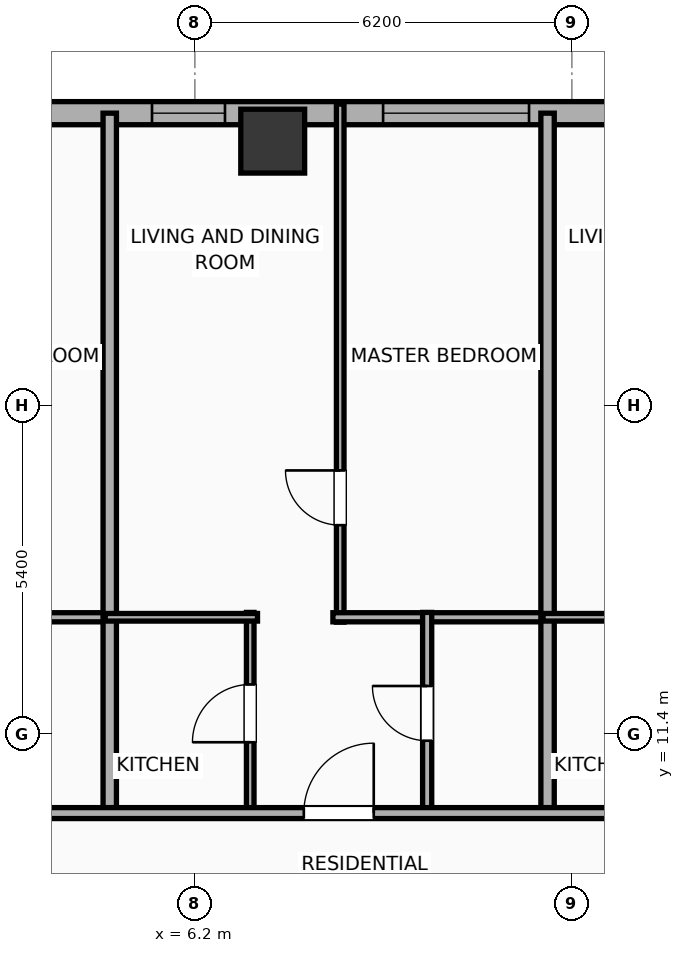
"""IFC4 building model, lengths in metres.
Left out: names, types, materials, properties, quantities, classifications, styles, units other than length and angle.
Written with IfcOpenShell. Run it as: python <this file> out.ifc"""

import sys

from ifc_helpers import new_model, si_unit, direction, frame, frame_2d, origin, origin_2d, place, context, subcontext, project, spatial, rectangle, hollow_rectangle, extrude, element, fill, save


model = new_model("IFC4")
c1 = context("Model", 3, precision=1e-05, world=origin(), true_north=direction((0.0, 1.0)))
c2 = subcontext(c1, "Body", "Model", "MODEL_VIEW")
j1 = project(units=[si_unit("LENGTHUNIT", "METRE"), si_unit("PLANEANGLEUNIT", "RADIAN")], contexts=[c1])
p1 = place(None, origin())
s1 = spatial("IfcSite", under=j1, at=p1, CompositionType="ELEMENT")
p2 = place(p1, origin())
s2 = spatial("IfcBuilding", under=s1, at=p2, CompositionType="ELEMENT")
p3 = place(p2, frame((0.0, 0.0, 136.5)))
s3 = spatial("IfcBuildingStorey", under=s2, at=p3, CompositionType="ELEMENT", Elevation=136.5)
p4 = place(p3, frame((7.48, 21.15, 0.0), z_axis=(0.0, 0.0, 1.0), x_axis=(1.0, 0.0, 0.0)))
e1 = element("IfcColumn", 1, at=p4, inside=s3, PredefinedType="COLUMN", context=c2, shape_type="SweptSolid", body=[
    extrude(hollow_rectangle(XDim=1.05, YDim=1.05, WallThickness=0.036, at=origin_2d()), origin(), (0.0, 0.0, 1.0), 3.865),
])
p5 = place(p3, frame((-25.381, 21.61, 0.0), z_axis=(0.0, 0.0, 1.0), x_axis=(1.0, 0.0, 0.0)))
e2 = element("IfcWall", 2, at=p5, inside=s3, PredefinedType="ELEMENTEDWALL", context=c2, shape_type="SweptSolid", body=[
    extrude(rectangle(XDim=54.763, YDim=0.38, at=frame_2d((27.381, 0.0))), origin(), (0.0, 0.0, 1.0), 2.39),
])
p6 = place(p5, frame((5.645, 0.0, 0.75)))
e3 = element("IfcOpeningElement", 3, at=p6, cuts=e2, PredefinedType="OPENING", context=c2, shape_type="SweptSolid", body=[
    extrude(rectangle(XDim=2.4, YDim=1.45, at=frame_2d((1.2, 0.725))), frame((0.0, 0.2, 0.0), z_axis=(0.0, -1.0, 0.0), x_axis=(1.0, 0.0, 0.0)), (0.0, 0.0, 1.0), 0.4),
])
p7 = place(p5, frame((34.677, 0.0, 0.75)))
e4 = element("IfcOpeningElement", 4, at=p7, cuts=e2, PredefinedType="OPENING", context=c2, shape_type="SweptSolid", body=[
    extrude(rectangle(XDim=2.4, YDim=1.45, at=frame_2d((1.2, 0.725))), frame((0.0, 0.2, 0.0), z_axis=(0.0, -1.0, 0.0), x_axis=(1.0, 0.0, 0.0)), (0.0, 0.0, 1.0), 0.4),
])
p8 = place(p5, frame((45.067, 0.0, 0.75)))
e5 = element("IfcOpeningElement", 5, at=p8, cuts=e2, PredefinedType="OPENING", context=c2, shape_type="SweptSolid", body=[
    extrude(rectangle(XDim=2.4, YDim=1.45, at=frame_2d((1.2, 0.725))), frame((0.0, 0.2, 0.0), z_axis=(0.0, -1.0, 0.0), x_axis=(1.0, 0.0, 0.0)), (0.0, 0.0, 1.0), 0.4),
])
p9 = place(p5, frame((2.938, 0.0, 0.55)))
e6 = element("IfcOpeningElement", 6, at=p9, cuts=e2, PredefinedType="OPENING", context=c2, shape_type="SweptSolid", body=[
    extrude(rectangle(XDim=1.2, YDim=1.15, at=frame_2d((0.6, 0.575))), frame((0.0, 0.2, 0.0), z_axis=(0.0, -1.0, 0.0), x_axis=(1.0, 0.0, 0.0)), (0.0, 0.0, 1.0), 0.4),
])
p10 = place(p5, frame((8.916, 0.0, 0.55)))
e7 = element("IfcOpeningElement", 7, at=p10, cuts=e2, PredefinedType="OPENING", context=c2, shape_type="SweptSolid", body=[
    extrude(rectangle(XDim=1.2, YDim=1.15, at=frame_2d((0.6, 0.575))), frame((0.0, 0.2, 0.0), z_axis=(0.0, -1.0, 0.0), x_axis=(1.0, 0.0, 0.0)), (0.0, 0.0, 1.0), 0.4),
])
p11 = place(p5, frame((13.476, 0.0, 0.55)))
e8 = element("IfcOpeningElement", 8, at=p11, cuts=e2, PredefinedType="OPENING", context=c2, shape_type="SweptSolid", body=[
    extrude(rectangle(XDim=1.2, YDim=1.15, at=frame_2d((0.6, 0.575))), frame((0.0, 0.2, 0.0), z_axis=(0.0, -1.0, 0.0), x_axis=(1.0, 0.0, 0.0)), (0.0, 0.0, 1.0), 0.4),
])
p12 = place(p5, frame((17.076, 0.0, 0.55)))
e9 = element("IfcOpeningElement", 9, at=p12, cuts=e2, PredefinedType="OPENING", context=c2, shape_type="SweptSolid", body=[
    extrude(rectangle(XDim=1.2, YDim=1.15, at=frame_2d((0.6, 0.575))), frame((0.0, 0.2, 0.0), z_axis=(0.0, -1.0, 0.0), x_axis=(1.0, 0.0, 0.0)), (0.0, 0.0, 1.0), 0.4),
])
p13 = place(p5, frame((19.956, 0.0, 0.55)))
e10 = element("IfcOpeningElement", 10, at=p13, cuts=e2, PredefinedType="OPENING", context=c2, shape_type="SweptSolid", body=[
    extrude(rectangle(XDim=1.2, YDim=1.15, at=frame_2d((0.6, 0.575))), frame((0.0, 0.2, 0.0), z_axis=(0.0, -1.0, 0.0), x_axis=(1.0, 0.0, 0.0)), (0.0, 0.0, 1.0), 0.4),
])
p14 = place(p5, frame((24.276, 0.0, 0.55)))
e11 = element("IfcOpeningElement", 11, at=p14, cuts=e2, PredefinedType="OPENING", context=c2, shape_type="SweptSolid", body=[
    extrude(rectangle(XDim=1.2, YDim=1.15, at=frame_2d((0.6, 0.575))), frame((0.0, 0.2, 0.0), z_axis=(0.0, -1.0, 0.0), x_axis=(1.0, 0.0, 0.0)), (0.0, 0.0, 1.0), 0.4),
])
p15 = place(p5, frame((27.876, 0.0, 0.55)))
e12 = element("IfcOpeningElement", 12, at=p15, cuts=e2, PredefinedType="OPENING", context=c2, shape_type="SweptSolid", body=[
    extrude(rectangle(XDim=1.2, YDim=1.15, at=frame_2d((0.6, 0.575))), frame((0.0, 0.2, 0.0), z_axis=(0.0, -1.0, 0.0), x_axis=(1.0, 0.0, 0.0)), (0.0, 0.0, 1.0), 0.4),
])
p16 = place(p5, frame((30.876, 0.0, 0.55)))
e13 = element("IfcOpeningElement", 13, at=p16, cuts=e2, PredefinedType="OPENING", context=c2, shape_type="SweptSolid", body=[
    extrude(rectangle(XDim=1.2, YDim=1.15, at=frame_2d((0.6, 0.575))), frame((0.0, 0.2, 0.0), z_axis=(0.0, -1.0, 0.0), x_axis=(1.0, 0.0, 0.0)), (0.0, 0.0, 1.0), 0.4),
])
p17 = place(p5, frame((38.676, 0.0, 0.55)))
e14 = element("IfcOpeningElement", 14, at=p17, cuts=e2, PredefinedType="OPENING", context=c2, shape_type="SweptSolid", body=[
    extrude(rectangle(XDim=1.2, YDim=1.15, at=frame_2d((0.6, 0.575))), frame((0.0, 0.2, 0.0), z_axis=(0.0, -1.0, 0.0), x_axis=(1.0, 0.0, 0.0)), (0.0, 0.0, 1.0), 0.4),
])
p18 = place(p5, frame((41.796, 0.0, 0.55)))
e15 = element("IfcOpeningElement", 15, at=p18, cuts=e2, PredefinedType="OPENING", context=c2, shape_type="SweptSolid", body=[
    extrude(rectangle(XDim=1.2, YDim=1.15, at=frame_2d((0.6, 0.575))), frame((0.0, 0.2, 0.0), z_axis=(0.0, -1.0, 0.0), x_axis=(1.0, 0.0, 0.0)), (0.0, 0.0, 1.0), 0.4),
])
p19 = place(p5, frame((49.476, 0.0, 0.55)))
e16 = element("IfcOpeningElement", 16, at=p19, cuts=e2, PredefinedType="OPENING", context=c2, shape_type="SweptSolid", body=[
    extrude(rectangle(XDim=1.2, YDim=1.15, at=frame_2d((0.6, 0.575))), frame((0.0, 0.2, 0.0), z_axis=(0.0, -1.0, 0.0), x_axis=(1.0, 0.0, 0.0)), (0.0, 0.0, 1.0), 0.4),
])
p20 = place(p5, frame((52.227, 0.0, 0.55)))
e17 = element("IfcOpeningElement", 17, at=p20, cuts=e2, PredefinedType="OPENING", context=c2, shape_type="SweptSolid", body=[
    extrude(rectangle(XDim=1.2, YDim=1.15, at=frame_2d((0.6, 0.575))), frame((0.0, 0.2, 0.0), z_axis=(0.0, -1.0, 0.0), x_axis=(1.0, 0.0, 0.0)), (0.0, 0.0, 1.0), 0.4),
])
p21 = place(p3, frame((1.27, 13.32, 0.0), z_axis=(0.0, 0.0, 1.0), x_axis=(1.0, 0.0, 0.0)))
e18 = element("IfcWall", 18, at=p21, inside=s3, PredefinedType="PLUMBINGWALL", context=c2, shape_type="SweptSolid", body=[
    extrude(rectangle(XDim=3.605, YDim=0.15, at=frame_2d((1.802, 0.0))), origin(), (0.0, 0.0, 1.0), 3.5),
])
p22 = place(p3, frame((4.8, 10.02, 0.0), z_axis=(0.0, 0.0, 1.0), x_axis=(0.0, 1.0, 0.0)))
e19 = element("IfcWall", 19, at=p22, inside=s3, PredefinedType="PARTITIONING", context=c2, shape_type="SweptSolid", body=[
    extrude(rectangle(XDim=11.59, YDim=0.22, at=frame_2d((5.795, 0.0))), origin(), (0.0, 0.0, 1.0), 3.5),
])
p23 = place(p3, frame((8.59, 13.24, 0.0), z_axis=(0.0, 0.0, 1.0), x_axis=(0.0, 1.0, 0.0)))
e20 = element("IfcWall", 20, at=p23, inside=s3, PredefinedType="PARTITIONING", context=c2, shape_type="SweptSolid", body=[
    extrude(rectangle(XDim=8.52, YDim=0.125, at=frame_2d((4.26, 0.0))), origin(), (0.0, 0.0, 1.0), 3.5),
])
p24 = place(p23, frame((1.595, 0.0, 0.0)))
e21 = element("IfcOpeningElement", 21, at=p24, cuts=e20, PredefinedType="OPENING", context=c2, shape_type="SweptSolid", body=[
    extrude(rectangle(XDim=0.9, YDim=2.05, at=frame_2d((0.45, 1.025))), frame((0.0, 0.073, 0.0), z_axis=(0.0, -1.0, 0.0), x_axis=(1.0, 0.0, 0.0)), (0.0, 0.0, 1.0), 0.145),
])
p25 = place(p3, frame((8.47, 13.32, 0.0), z_axis=(0.0, 0.0, 1.0), x_axis=(1.0, 0.0, 0.0)))
e22 = element("IfcWall", 22, at=p25, inside=s3, PredefinedType="PLUMBINGWALL", context=c2, shape_type="SweptSolid", body=[
    extrude(rectangle(XDim=3.605, YDim=0.15, at=frame_2d((1.802, 0.0))), origin(), (0.0, 0.0, 1.0), 3.5),
])
p26 = place(p3, frame((7.11, 10.08, 0.0), z_axis=(0.0, 0.0, 1.0), x_axis=(0.0, 1.0, 0.0)))
e23 = element("IfcWall", 23, at=p26, inside=s3, PredefinedType="PARTITIONING", context=c2, shape_type="SweptSolid", body=[
    extrude(rectangle(XDim=3.32, YDim=0.125, at=frame_2d((1.66, 0.0))), origin(), (0.0, 0.0, 1.0), 3.5),
])
p27 = place(p26, frame((1.185, 0.0, 0.0)))
e24 = element("IfcOpeningElement", 24, at=p27, cuts=e23, PredefinedType="OPENING", context=c2, shape_type="SweptSolid", body=[
    extrude(rectangle(XDim=0.95, YDim=2.05, at=frame_2d((0.475, 1.025))), frame((0.0, 0.073, 0.0), z_axis=(0.0, -1.0, 0.0), x_axis=(1.0, 0.0, 0.0)), (0.0, 0.0, 1.0), 0.145),
])
p28 = place(p3, frame((4.725, 13.32, 0.0), z_axis=(0.0, 0.0, 1.0), x_axis=(1.0, 0.0, 0.0)))
e25 = element("IfcWall", 25, at=p28, inside=s3, PredefinedType="PARTITIONING", context=c2, shape_type="SweptSolid", body=[
    extrude(rectangle(XDim=2.505, YDim=0.125, at=frame_2d((1.252, 0.0))), origin(), (0.0, 0.0, 1.0), 3.5),
])
p29 = place(p3, frame((10.02, 10.08, 0.0), z_axis=(0.0, 0.0, 1.0), x_axis=(0.0, 1.0, 0.0)))
e26 = element("IfcWall", 26, at=p29, inside=s3, PredefinedType="PLUMBINGWALL", context=c2, shape_type="SweptSolid", body=[
    extrude(rectangle(XDim=3.32, YDim=0.15, at=frame_2d((1.66, 0.0))), origin(), (0.0, 0.0, 1.0), 3.5),
])
p30 = place(p29, frame((1.21, 0.0, 0.0)))
e27 = element("IfcOpeningElement", 27, at=p30, cuts=e26, PredefinedType="OPENING", context=c2, shape_type="SweptSolid", body=[
    extrude(rectangle(XDim=0.9, YDim=2.05, at=frame_2d((0.45, 1.025))), frame((0.0, 0.085, 0.0), z_axis=(0.0, -1.0, 0.0), x_axis=(1.0, 0.0, 0.0)), (0.0, 0.0, 1.0), 0.17),
])
p31 = place(p3, frame((12.0, 10.02, 0.0), z_axis=(0.0, 0.0, 1.0), x_axis=(0.0, 1.0, 0.0)))
e28 = element("IfcWall", 28, at=p31, inside=s3, PredefinedType="PARTITIONING", context=c2, shape_type="SweptSolid", body=[
    extrude(rectangle(XDim=11.59, YDim=0.22, at=frame_2d((5.795, 0.0))), origin(), (0.0, 0.0, 1.0), 2.39),
])
p32 = place(p3, frame((11.925, 13.32, 0.0), z_axis=(0.0, 0.0, 1.0), x_axis=(1.0, 0.0, 0.0)))
e29 = element("IfcWall", 29, at=p32, inside=s3, PredefinedType="PARTITIONING", context=c2, shape_type="SweptSolid", body=[
    extrude(rectangle(XDim=2.505, YDim=0.125, at=frame_2d((1.252, 0.0))), origin(), (0.0, 0.0, 1.0), 3.5),
])
p33 = place(p3, frame((-29.21, 10.1, 0.0), z_axis=(0.0, 0.0, 1.0), x_axis=(1.0, 0.0, 0.0)))
e30 = element("IfcWall", 30, at=p33, inside=s3, PredefinedType="PARTITIONING", context=c2, shape_type="SweptSolid", body=[
    extrude(rectangle(XDim=62.42, YDim=0.18, at=frame_2d((31.21, 0.0))), origin(), (0.0, 0.0, 1.0), 2.39),
])
p34 = place(p33, frame((2.74, 0.0, 0.0)))
e31 = element("IfcOpeningElement", 31, at=p34, cuts=e30, PredefinedType="OPENING", context=c2, shape_type="SweptSolid", body=[
    extrude(rectangle(XDim=0.9, YDim=2.05, at=frame_2d((0.45, 1.025))), frame((0.0, 0.1, 0.0), z_axis=(0.0, -1.0, 0.0), x_axis=(1.0, 0.0, 0.0)), (0.0, 0.0, 1.0), 0.2),
])
p35 = place(p33, frame((9.868, 0.0, 0.0)))
e32 = element("IfcOpeningElement", 32, at=p35, cuts=e30, PredefinedType="OPENING", context=c2, shape_type="SweptSolid", body=[
    extrude(rectangle(XDim=1.15, YDim=2.05, at=frame_2d((0.575, 1.025))), frame((0.0, 0.1, 0.0), z_axis=(0.0, -1.0, 0.0), x_axis=(1.0, 0.0, 0.0)), (0.0, 0.0, 1.0), 0.2),
])
p36 = place(p33, frame((15.598, 0.0, 0.0)))
e33 = element("IfcOpeningElement", 33, at=p36, cuts=e30, PredefinedType="OPENING", context=c2, shape_type="SweptSolid", body=[
    extrude(rectangle(XDim=1.15, YDim=2.05, at=frame_2d((0.575, 1.025))), frame((0.0, 0.1, 0.0), z_axis=(0.0, -1.0, 0.0), x_axis=(1.0, 0.0, 0.0)), (0.0, 0.0, 1.0), 0.2),
])
p37 = place(p33, frame((22.801, 0.0, 0.0)))
e34 = element("IfcOpeningElement", 34, at=p37, cuts=e30, PredefinedType="OPENING", context=c2, shape_type="SweptSolid", body=[
    extrude(rectangle(XDim=1.15, YDim=2.05, at=frame_2d((0.575, 1.025))), frame((0.0, 0.1, 0.0), z_axis=(0.0, -1.0, 0.0), x_axis=(1.0, 0.0, 0.0)), (0.0, 0.0, 1.0), 0.2),
])
p38 = place(p33, frame((29.998, 0.0, 0.0)))
e35 = element("IfcOpeningElement", 35, at=p38, cuts=e30, PredefinedType="OPENING", context=c2, shape_type="SweptSolid", body=[
    extrude(rectangle(XDim=1.15, YDim=2.05, at=frame_2d((0.575, 1.025))), frame((0.0, 0.1, 0.0), z_axis=(0.0, -1.0, 0.0), x_axis=(1.0, 0.0, 0.0)), (0.0, 0.0, 1.0), 0.2),
])
p39 = place(p33, frame((37.202, 0.0, 0.0)))
e36 = element("IfcOpeningElement", 36, at=p39, cuts=e30, PredefinedType="OPENING", context=c2, shape_type="SweptSolid", body=[
    extrude(rectangle(XDim=1.15, YDim=2.05, at=frame_2d((0.575, 1.025))), frame((0.0, 0.1, 0.0), z_axis=(0.0, -1.0, 0.0), x_axis=(1.0, 0.0, 0.0)), (0.0, 0.0, 1.0), 0.2),
])
p40 = place(p33, frame((44.399, 0.0, 0.0)))
e37 = element("IfcOpeningElement", 37, at=p40, cuts=e30, PredefinedType="OPENING", context=c2, shape_type="SweptSolid", body=[
    extrude(rectangle(XDim=1.15, YDim=2.05, at=frame_2d((0.575, 1.025))), frame((0.0, 0.1, 0.0), z_axis=(0.0, -1.0, 0.0), x_axis=(1.0, 0.0, 0.0)), (0.0, 0.0, 1.0), 0.2),
])
p41 = place(p33, frame((51.602, 0.0, 0.0)))
e38 = element("IfcOpeningElement", 38, at=p41, cuts=e30, PredefinedType="OPENING", context=c2, shape_type="SweptSolid", body=[
    extrude(rectangle(XDim=1.15, YDim=2.05, at=frame_2d((0.575, 1.025))), frame((0.0, 0.1, 0.0), z_axis=(0.0, -1.0, 0.0), x_axis=(1.0, 0.0, 0.0)), (0.0, 0.0, 1.0), 0.2),
])
p42 = place(p33, frame((58.762, 0.0, 0.0)))
e39 = element("IfcOpeningElement", 39, at=p42, cuts=e30, PredefinedType="OPENING", context=c2, shape_type="SweptSolid", body=[
    extrude(rectangle(XDim=0.9, YDim=2.05, at=frame_2d((0.45, 1.025))), frame((0.0, 0.1, 0.0), z_axis=(0.0, -1.0, 0.0), x_axis=(1.0, 0.0, 0.0)), (0.0, 0.0, 1.0), 0.2),
])
p43 = place(p7, origin())
e40 = element("IfcWindow", 40, at=p43, inside=s3, PartitioningType="SINGLE_PANEL", PredefinedType="WINDOW", context=c2, shape_type="SweptSolid", body=[
    extrude(rectangle(XDim=2.4, YDim=1.45, at=frame_2d((1.2, 0.725))), frame((0.0, 0.03, 0.0), z_axis=(0.0, -1.0, 0.0), x_axis=(1.0, 0.0, 0.0)), (0.0, 0.0, 1.0), 0.06),
])
fill(e4, e40)
p44 = place(p16, origin())
e41 = element("IfcWindow", 41, at=p44, inside=s3, PartitioningType="SINGLE_PANEL", PredefinedType="WINDOW", context=c2, shape_type="SweptSolid", body=[
    extrude(rectangle(XDim=1.2, YDim=1.15, at=frame_2d((0.6, 0.575))), frame((0.0, 0.03, 0.0), z_axis=(0.0, -1.0, 0.0), x_axis=(1.0, 0.0, 0.0)), (0.0, 0.0, 1.0), 0.06),
])
fill(e13, e41)
p45 = place(p24, origin())
e42 = element("IfcDoor", 42, at=p45, inside=s3, OperationType="SINGLE_SWING_RIGHT", PredefinedType="DOOR", context=c2, shape_type="SweptSolid", body=[
    extrude(rectangle(XDim=0.9, YDim=2.05, at=frame_2d((0.45, 1.025))), frame((0.0, 0.025, 0.0), z_axis=(0.0, -1.0, 0.0), x_axis=(1.0, 0.0, 0.0)), (0.0, 0.0, 1.0), 0.05),
])
fill(e21, e42)
p46 = place(p27, origin())
e43 = element("IfcDoor", 43, at=p46, inside=s3, OperationType="SINGLE_SWING_LEFT", PredefinedType="DOOR", context=c2, shape_type="SweptSolid", body=[
    extrude(rectangle(XDim=0.95, YDim=2.05, at=frame_2d((0.475, 1.025))), frame((0.0, 0.025, 0.0), z_axis=(0.0, -1.0, 0.0), x_axis=(1.0, 0.0, 0.0)), (0.0, 0.0, 1.0), 0.05),
])
fill(e24, e43)
p47 = place(p30, origin())
e44 = element("IfcDoor", 44, at=p47, inside=s3, OperationType="SINGLE_SWING_RIGHT", PredefinedType="DOOR", context=c2, shape_type="SweptSolid", body=[
    extrude(rectangle(XDim=0.9, YDim=2.05, at=frame_2d((0.45, 1.025))), frame((0.0, 0.025, 0.0), z_axis=(0.0, -1.0, 0.0), x_axis=(1.0, 0.0, 0.0)), (0.0, 0.0, 1.0), 0.05),
])
fill(e27, e44)
p48 = place(p39, origin())
e45 = element("IfcDoor", 45, at=p48, inside=s3, OperationType="SINGLE_SWING_RIGHT", PredefinedType="DOOR", context=c2, shape_type="SweptSolid", body=[
    extrude(rectangle(XDim=1.15, YDim=2.05, at=frame_2d((0.575, 1.025))), frame((0.0, 0.025, 0.0), z_axis=(0.0, -1.0, 0.0), x_axis=(1.0, 0.0, 0.0)), (0.0, 0.0, 1.0), 0.05),
])
fill(e36, e45)
save(model, sys.argv[1])
